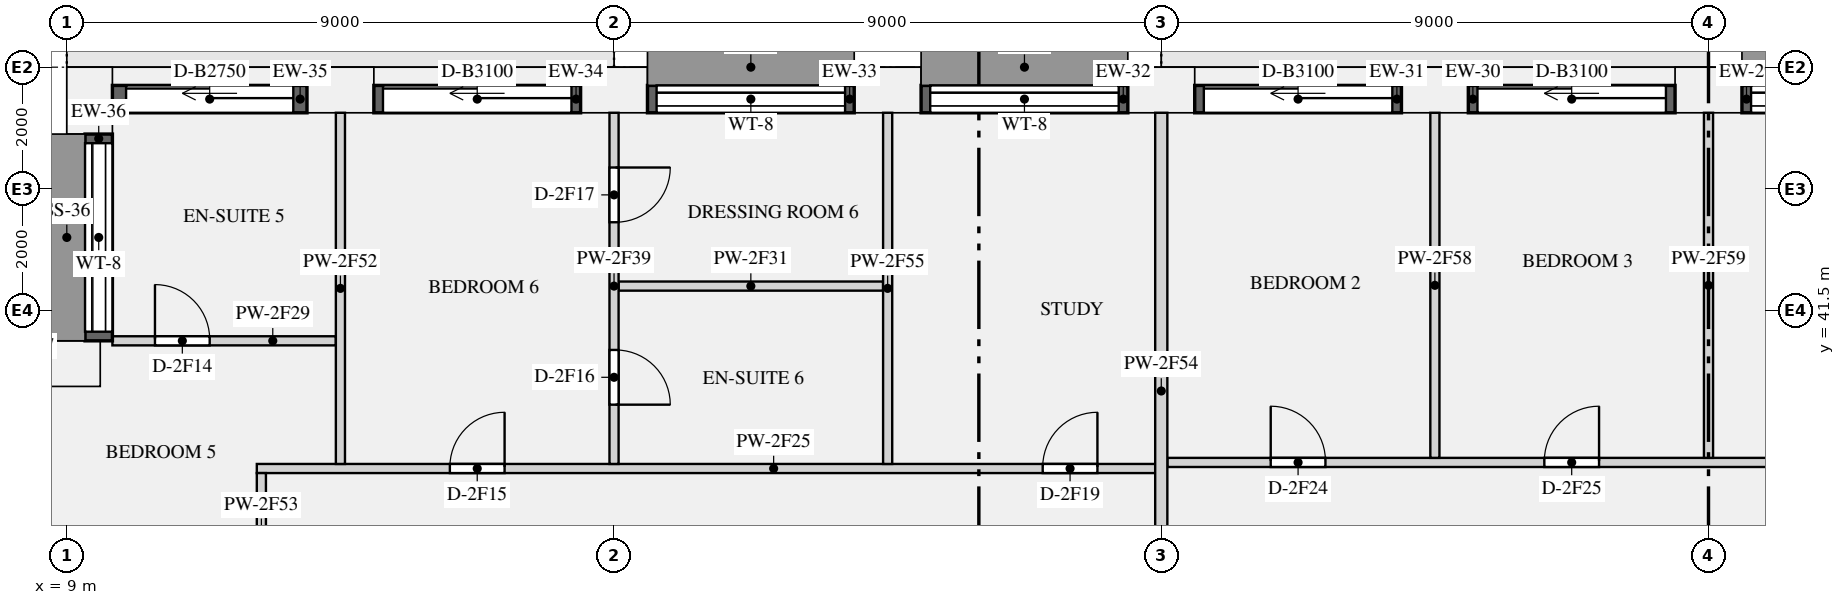
"""IFC4 building model, lengths in metres.
Left out: names, types, materials, properties, quantities, classifications, styles, units other than length and angle.
Written with IfcOpenShell. Run it as: python <this file> out.ifc"""

import sys

from ifc_helpers import new_model, si_unit, direction, frame, frame_2d, origin, origin_2d, place, context, subcontext, project, spatial, rectangle, extrude, element, fill, save


model = new_model("IFC4")
c1 = context("Model", 3, precision=1e-05, world=origin(), true_north=direction((0.0, 1.0)))
c2 = subcontext(c1, "Body", "Model", "MODEL_VIEW")
j1 = project(units=[si_unit("LENGTHUNIT", "METRE"), si_unit("PLANEANGLEUNIT", "RADIAN")], contexts=[c1])
p1 = place(None, origin())
s1 = spatial("IfcSite", under=j1, at=p1, CompositionType="ELEMENT")
p2 = place(p1, origin())
s2 = spatial("IfcBuilding", under=s1, at=p2, CompositionType="ELEMENT")
p3 = place(p2, frame((0.0, 0.0, 127.65)))
s3 = spatial("IfcBuildingStorey", under=s2, at=p3, CompositionType="ELEMENT", Elevation=127.65)
for number, where, z_axis, x_axis in (
    (1, (36.0, 45.125, 0.0), (0.0, 0.0, 1.0), (-1.0, 0.0, 0.0)),
    (2, (31.5, 45.125, 0.0), (0.0, 0.0, 1.0), (-1.0, 0.0, 0.0)),
    (3, (27.0, 45.125, 0.0), (0.0, 0.0, 1.0), (-1.0, 0.0, 0.0)),
    (4, (22.5, 45.125, 0.0), (0.0, 0.0, 1.0), (-1.0, 0.0, 0.0)),
    (5, (18.0, 45.125, 0.0), (0.0, 0.0, 1.0), (-1.0, 0.0, 0.0)),
    (6, (13.5, 45.125, 0.0), (0.0, 0.0, 1.0), (-1.0, 0.0, 0.0)),
    (7, (9.375, 44.95, 0.0), (0.0, 0.0, 1.0), (0.0, -1.0, 0.0)),
    (8, (9.0, 40.625, 0.0), (0.0, 0.0, 1.0), (-1.0, 0.0, 0.0)),
):
    element("IfcColumn", number, at=place(p3, frame(where, z_axis=z_axis, x_axis=x_axis)), inside=s3, PredefinedType="USERDEFINED", context=c2, shape_type="SweptSolid", body=[
        extrude(rectangle(XDim=1.1, YDim=0.75, at=origin_2d()), origin(), (0.0, 0.0, 1.0), 3.15),
    ])
p4 = place(p3, frame((39.95, 44.975, 0.9), z_axis=(0.0, 0.0, 1.0), x_axis=(-1.0, 0.0, 0.0)))
e9 = element("IfcWall", 9, at=p4, inside=s3, PredefinedType="SOLIDWALL", context=c2, shape_type="SweptSolid", body=[
    extrude(rectangle(XDim=3.4, YDim=0.45, at=frame_2d((1.7, 0.0))), origin(), (0.0, 0.0, 1.0), 1.75),
])
p5 = place(p4, frame((0.15, 0.0, 0.15)))
e10 = element("IfcOpeningElement", 10, at=p5, cuts=e9, PredefinedType="OPENING", context=c2, shape_type="SweptSolid", body=[
    extrude(rectangle(XDim=3.1, YDim=1.5, at=frame_2d((1.55, 0.75))), frame((0.0, 0.235, 0.0), z_axis=(0.0, -1.0, 0.0), x_axis=(1.0, 0.0, 0.0)), (0.0, 0.0, 1.0), 0.47),
])
p6 = place(p3, frame((35.45, 44.975, 0.0), z_axis=(0.0, 0.0, 1.0), x_axis=(-1.0, 0.0, 0.0)))
e11 = element("IfcWall", 11, at=p6, inside=s3, PredefinedType="SOLIDWALL", context=c2, shape_type="SweptSolid", body=[
    extrude(rectangle(XDim=3.4, YDim=0.45, at=frame_2d((1.7, 0.0))), origin(), (0.0, 0.0, 1.0), 2.65),
])
p7 = place(p6, frame((0.15, 0.0, 0.0)))
e12 = element("IfcOpeningElement", 12, at=p7, cuts=e11, PredefinedType="OPENING", context=c2, shape_type="SweptSolid", body=[
    extrude(rectangle(XDim=3.1, YDim=2.3, at=frame_2d((1.55, 1.15))), frame((0.0, 0.235, 0.0), z_axis=(0.0, -1.0, 0.0), x_axis=(1.0, 0.0, 0.0)), (0.0, 0.0, 1.0), 0.47),
])
p8 = place(p3, frame((30.95, 44.975, 0.0), z_axis=(0.0, 0.0, 1.0), x_axis=(-1.0, 0.0, 0.0)))
e13 = element("IfcWall", 13, at=p8, inside=s3, PredefinedType="SOLIDWALL", context=c2, shape_type="SweptSolid", body=[
    extrude(rectangle(XDim=3.4, YDim=0.45, at=frame_2d((1.7, 0.0))), origin(), (0.0, 0.0, 1.0), 2.65),
])
p9 = place(p8, frame((0.15, 0.0, 0.0)))
e14 = element("IfcOpeningElement", 14, at=p9, cuts=e13, PredefinedType="OPENING", context=c2, shape_type="SweptSolid", body=[
    extrude(rectangle(XDim=3.1, YDim=2.3, at=frame_2d((1.55, 1.15))), frame((0.0, 0.235, 0.0), z_axis=(0.0, -1.0, 0.0), x_axis=(1.0, 0.0, 0.0)), (0.0, 0.0, 1.0), 0.47),
])
p10 = place(p3, frame((26.45, 44.975, 0.9), z_axis=(0.0, 0.0, 1.0), x_axis=(-1.0, 0.0, 0.0)))
e15 = element("IfcWall", 15, at=p10, inside=s3, PredefinedType="SOLIDWALL", context=c2, shape_type="SweptSolid", body=[
    extrude(rectangle(XDim=3.4, YDim=0.45, at=frame_2d((1.7, 0.0))), origin(), (0.0, 0.0, 1.0), 1.75),
])
p11 = place(p10, frame((0.15, 0.0, 0.15)))
e16 = element("IfcOpeningElement", 16, at=p11, cuts=e15, PredefinedType="OPENING", context=c2, shape_type="SweptSolid", body=[
    extrude(rectangle(XDim=3.1, YDim=1.5, at=frame_2d((1.55, 0.75))), frame((0.0, 0.235, 0.0), z_axis=(0.0, -1.0, 0.0), x_axis=(1.0, 0.0, 0.0)), (0.0, 0.0, 1.0), 0.47),
])
p12 = place(p3, frame((21.95, 44.975, 0.9), z_axis=(0.0, 0.0, 1.0), x_axis=(-1.0, 0.0, 0.0)))
e17 = element("IfcWall", 17, at=p12, inside=s3, PredefinedType="SOLIDWALL", context=c2, shape_type="SweptSolid", body=[
    extrude(rectangle(XDim=3.4, YDim=0.45, at=frame_2d((1.7, 0.0))), origin(), (0.0, 0.0, 1.0), 1.75),
])
p13 = place(p12, frame((0.15, 0.0, 0.15)))
e18 = element("IfcOpeningElement", 18, at=p13, cuts=e17, PredefinedType="OPENING", context=c2, shape_type="SweptSolid", body=[
    extrude(rectangle(XDim=3.1, YDim=1.5, at=frame_2d((1.55, 0.75))), frame((0.0, 0.235, 0.0), z_axis=(0.0, -1.0, 0.0), x_axis=(1.0, 0.0, 0.0)), (0.0, 0.0, 1.0), 0.47),
])
p14 = place(p3, frame((17.45, 44.975, 0.0), z_axis=(0.0, 0.0, 1.0), x_axis=(-1.0, 0.0, 0.0)))
e19 = element("IfcWall", 19, at=p14, inside=s3, PredefinedType="SOLIDWALL", context=c2, shape_type="SweptSolid", body=[
    extrude(rectangle(XDim=3.4, YDim=0.45, at=frame_2d((1.7, 0.0))), origin(), (0.0, 0.0, 1.0), 2.65),
])
p15 = place(p14, frame((0.15, 0.0, 0.0)))
e20 = element("IfcOpeningElement", 20, at=p15, cuts=e19, PredefinedType="OPENING", context=c2, shape_type="SweptSolid", body=[
    extrude(rectangle(XDim=3.1, YDim=2.3, at=frame_2d((1.55, 1.15))), frame((0.0, 0.235, 0.0), z_axis=(0.0, -1.0, 0.0), x_axis=(1.0, 0.0, 0.0)), (0.0, 0.0, 1.0), 0.47),
])
p16 = place(p3, frame((12.95, 44.975, 0.0), z_axis=(0.0, 0.0, 1.0), x_axis=(-1.0, 0.0, 0.0)))
e21 = element("IfcWall", 21, at=p16, inside=s3, PredefinedType="SOLIDWALL", context=c2, shape_type="SweptSolid", body=[
    extrude(rectangle(XDim=3.2, YDim=0.45, at=frame_2d((1.6, 0.0))), origin(), (0.0, 0.0, 1.0), 2.65),
])
p17 = place(p16, frame((0.225, 0.0, 0.0)))
e22 = element("IfcOpeningElement", 22, at=p17, cuts=e21, PredefinedType="OPENING", context=c2, shape_type="SweptSolid", body=[
    extrude(rectangle(XDim=2.75, YDim=2.3, at=frame_2d((1.375, 1.15))), frame((0.0, 0.235, 0.0), z_axis=(0.0, -1.0, 0.0), x_axis=(1.0, 0.0, 0.0)), (0.0, 0.0, 1.0), 0.47),
])
p18 = place(p3, frame((9.525, 44.4, 0.9), z_axis=(0.0, 0.0, 1.0), x_axis=(0.0, -1.0, 0.0)))
e23 = element("IfcWall", 23, at=p18, inside=s3, PredefinedType="SOLIDWALL", context=c2, shape_type="SweptSolid", body=[
    extrude(rectangle(XDim=3.4, YDim=0.45, at=frame_2d((1.7, 0.0))), origin(), (0.0, 0.0, 1.0), 1.75),
])
p19 = place(p18, frame((0.15, 0.0, 0.15)))
e24 = element("IfcOpeningElement", 24, at=p19, cuts=e23, PredefinedType="OPENING", context=c2, shape_type="SweptSolid", body=[
    extrude(rectangle(XDim=3.1, YDim=1.5, at=frame_2d((1.55, 0.75))), frame((0.0, 0.235, 0.0), z_axis=(0.0, -1.0, 0.0), x_axis=(1.0, 0.0, 0.0)), (0.0, 0.0, 1.0), 0.47),
])
p20 = place(p3, frame((12.125, 38.9, 0.0), z_axis=(0.0, 0.0, 1.0), x_axis=(1.0, 0.0, 0.0)))
e25 = element("IfcWall", 25, at=p20, inside=s3, PredefinedType="PARTITIONING", context=c2, shape_type="SweptSolid", body=[
    extrude(rectangle(XDim=14.775, YDim=0.15, at=frame_2d((7.387, 0.0))), origin(), (0.0, 0.0, 1.0), 2.65),
])
p21 = place(p20, frame((3.175, 0.0, 0.0)))
e26 = element("IfcOpeningElement", 26, at=p21, cuts=e25, PredefinedType="OPENING", context=c2, shape_type="SweptSolid", body=[
    extrude(rectangle(XDim=0.9, YDim=2.1, at=frame_2d((0.45, 1.05))), frame((0.0, 0.085, 0.0), z_axis=(0.0, -1.0, 0.0), x_axis=(1.0, 0.0, 0.0)), (0.0, 0.0, 1.0), 0.17),
])
p22 = place(p20, frame((12.925, 0.0, 0.0)))
e27 = element("IfcOpeningElement", 27, at=p22, cuts=e25, PredefinedType="OPENING", context=c2, shape_type="SweptSolid", body=[
    extrude(rectangle(XDim=0.9, YDim=2.1, at=frame_2d((0.45, 1.05))), frame((0.0, 0.085, 0.0), z_axis=(0.0, -1.0, 0.0), x_axis=(1.0, 0.0, 0.0)), (0.0, 0.0, 1.0), 0.17),
])
p23 = place(p3, frame((9.75, 41.0, 0.0), z_axis=(0.0, 0.0, 1.0), x_axis=(1.0, 0.0, 0.0)))
e28 = element("IfcWall", 28, at=p23, inside=s3, PredefinedType="PARTITIONING", context=c2, shape_type="SweptSolid", body=[
    extrude(rectangle(XDim=3.675, YDim=0.15, at=frame_2d((1.837, 0.0))), origin(), (0.0, 0.0, 1.0), 2.65),
])
p24 = place(p23, frame((0.7, 0.0, 0.0)))
e29 = element("IfcOpeningElement", 29, at=p24, cuts=e28, PredefinedType="OPENING", context=c2, shape_type="SweptSolid", body=[
    extrude(rectangle(XDim=0.9, YDim=2.1, at=frame_2d((0.45, 1.05))), frame((0.0, 0.085, 0.0), z_axis=(0.0, -1.0, 0.0), x_axis=(1.0, 0.0, 0.0)), (0.0, 0.0, 1.0), 0.17),
])
p25 = place(p3, frame((18.075, 41.9, 0.0), z_axis=(0.0, 0.0, 1.0), x_axis=(1.0, 0.0, 0.0)))
e30 = element("IfcWall", 30, at=p25, inside=s3, PredefinedType="PARTITIONING", context=c2, shape_type="SweptSolid", body=[
    extrude(rectangle(XDim=4.35, YDim=0.15, at=frame_2d((2.175, 0.0))), origin(), (0.0, 0.0, 1.0), 2.65),
])
p26 = place(p3, frame((27.1, 39.0, 0.0), z_axis=(0.0, 0.0, 1.0), x_axis=(1.0, 0.0, 0.0)))
e31 = element("IfcWall", 31, at=p26, inside=s3, PredefinedType="PARTITIONING", context=c2, shape_type="SweptSolid", body=[
    extrude(rectangle(XDim=22.475, YDim=0.15, at=frame_2d((11.237, 0.0))), origin(), (0.0, 0.0, 1.0), 2.65),
])
p27 = place(p26, frame((1.7, 0.0, 0.0)))
e32 = element("IfcOpeningElement", 32, at=p27, cuts=e31, PredefinedType="OPENING", context=c2, shape_type="SweptSolid", body=[
    extrude(rectangle(XDim=0.9, YDim=2.1, at=frame_2d((0.45, 1.05))), frame((0.0, 0.085, 0.0), z_axis=(0.0, -1.0, 0.0), x_axis=(1.0, 0.0, 0.0)), (0.0, 0.0, 1.0), 0.17),
])
p28 = place(p26, frame((6.2, 0.0, 0.0)))
e33 = element("IfcOpeningElement", 33, at=p28, cuts=e31, PredefinedType="OPENING", context=c2, shape_type="SweptSolid", body=[
    extrude(rectangle(XDim=0.9, YDim=2.1, at=frame_2d((0.45, 1.05))), frame((0.0, 0.085, 0.0), z_axis=(0.0, -1.0, 0.0), x_axis=(1.0, 0.0, 0.0)), (0.0, 0.0, 1.0), 0.17),
])
p29 = place(p26, frame((12.95, 0.0, 0.0)))
e34 = element("IfcOpeningElement", 34, at=p29, cuts=e31, PredefinedType="OPENING", context=c2, shape_type="SweptSolid", body=[
    extrude(rectangle(XDim=0.9, YDim=2.1, at=frame_2d((0.45, 1.05))), frame((0.0, 0.085, 0.0), z_axis=(0.0, -1.0, 0.0), x_axis=(1.0, 0.0, 0.0)), (0.0, 0.0, 1.0), 0.17),
])
p30 = place(p3, frame((18.0, 38.975, 0.0), z_axis=(0.0, 0.0, 1.0), x_axis=(0.0, 1.0, 0.0)))
e35 = element("IfcWall", 35, at=p30, inside=s3, PredefinedType="PARTITIONING", context=c2, shape_type="SweptSolid", body=[
    extrude(rectangle(XDim=5.775, YDim=0.15, at=frame_2d((2.887, 0.0))), origin(), (0.0, 0.0, 1.0), 2.65),
])
p31 = place(p30, frame((0.975, 0.0, 0.0)))
e36 = element("IfcOpeningElement", 36, at=p31, cuts=e35, PredefinedType="OPENING", context=c2, shape_type="SweptSolid", body=[
    extrude(rectangle(XDim=0.9, YDim=2.1, at=frame_2d((0.45, 1.05))), frame((0.0, 0.085, 0.0), z_axis=(0.0, -1.0, 0.0), x_axis=(1.0, 0.0, 0.0)), (0.0, 0.0, 1.0), 0.17),
])
p32 = place(p30, frame((3.975, 0.0, 0.0)))
e37 = element("IfcOpeningElement", 37, at=p32, cuts=e35, PredefinedType="OPENING", context=c2, shape_type="SweptSolid", body=[
    extrude(rectangle(XDim=0.9, YDim=2.1, at=frame_2d((0.45, 1.05))), frame((0.0, 0.085, 0.0), z_axis=(0.0, -1.0, 0.0), x_axis=(1.0, 0.0, 0.0)), (0.0, 0.0, 1.0), 0.17),
])
p33 = place(p3, frame((13.5, 38.975, 0.0), z_axis=(0.0, 0.0, 1.0), x_axis=(0.0, 1.0, 0.0)))
e38 = element("IfcWall", 38, at=p33, inside=s3, PredefinedType="PARTITIONING", context=c2, shape_type="SweptSolid", body=[
    extrude(rectangle(XDim=5.775, YDim=0.15, at=frame_2d((2.887, 0.0))), origin(), (0.0, 0.0, 1.0), 2.65),
])
p34 = place(p3, frame((12.2, 36.908, 0.0), z_axis=(0.0, 0.0, 1.0), x_axis=(0.0, 1.0, 0.0)))
e39 = element("IfcWall", 39, at=p34, inside=s3, PredefinedType="PARTITIONING", context=c2, shape_type="SweptSolid", body=[
    extrude(rectangle(XDim=1.917, YDim=0.15, at=frame_2d((0.958, 0.0))), origin(), (0.0, 0.0, 1.0), 2.65),
])
p35 = place(p3, frame((27.0, 35.6, 0.0), z_axis=(0.0, 0.0, 1.0), x_axis=(0.0, 1.0, 0.0)))
e40 = element("IfcWall", 40, at=p35, inside=s3, PredefinedType="PARTITIONING", context=c2, shape_type="SweptSolid", body=[
    extrude(rectangle(XDim=9.15, YDim=0.2, at=frame_2d((4.575, 0.0))), origin(), (0.0, 0.0, 1.0), 2.65),
])
p36 = place(p3, frame((22.5, 38.975, 0.0), z_axis=(0.0, 0.0, 1.0), x_axis=(0.0, 1.0, 0.0)))
e41 = element("IfcWall", 41, at=p36, inside=s3, PredefinedType="PARTITIONING", context=c2, shape_type="SweptSolid", body=[
    extrude(rectangle(XDim=5.775, YDim=0.15, at=frame_2d((2.887, 0.0))), origin(), (0.0, 0.0, 1.0), 2.65),
])
for number, where, z_axis, x_axis in (
    (42, (31.5, 39.075, 0.0), (0.0, 0.0, 1.0), (0.0, 1.0, 0.0)),
    (43, (36.0, 39.075, 0.0), (0.0, 0.0, 1.0), (0.0, 1.0, 0.0)),
):
    element("IfcWall", number, at=place(p3, frame(where, z_axis=z_axis, x_axis=x_axis)), inside=s3, PredefinedType="PARTITIONING", context=c2, shape_type="SweptSolid", body=[
        extrude(rectangle(XDim=5.675, YDim=0.15, at=frame_2d((2.837, 0.0))), origin(), (0.0, 0.0, 1.0), 2.65),
    ])
p37 = place(p5, origin())
e44 = element("IfcWindow", 44, at=p37, inside=s3, PartitioningType="SINGLE_PANEL", PredefinedType="WINDOW", context=c2, shape_type="SweptSolid", body=[
    extrude(rectangle(XDim=3.1, YDim=1.5, at=frame_2d((1.55, 0.75))), frame((0.0, -0.065, 0.0), z_axis=(0.0, -1.0, 0.0), x_axis=(1.0, 0.0, 0.0)), (0.0, 0.0, 1.0), 0.06),
])
fill(e10, e44)
p38 = place(p7, origin())
e45 = element("IfcDoor", 45, at=p38, inside=s3, OperationType="SLIDING_TO_LEFT", PredefinedType="DOOR", context=c2, shape_type="SweptSolid", body=[
    extrude(rectangle(XDim=3.1, YDim=2.3, at=frame_2d((1.55, 1.15))), frame((0.0, -0.07, 0.0), z_axis=(0.0, -1.0, 0.0), x_axis=(1.0, 0.0, 0.0)), (0.0, 0.0, 1.0), 0.05),
])
fill(e12, e45)
p39 = place(p9, origin())
e46 = element("IfcDoor", 46, at=p39, inside=s3, OperationType="SLIDING_TO_LEFT", PredefinedType="DOOR", context=c2, shape_type="SweptSolid", body=[
    extrude(rectangle(XDim=3.1, YDim=2.3, at=frame_2d((1.55, 1.15))), frame((0.0, -0.07, 0.0), z_axis=(0.0, -1.0, 0.0), x_axis=(1.0, 0.0, 0.0)), (0.0, 0.0, 1.0), 0.05),
])
fill(e14, e46)
p40 = place(p11, origin())
e47 = element("IfcWindow", 47, at=p40, inside=s3, PartitioningType="SINGLE_PANEL", PredefinedType="WINDOW", context=c2, shape_type="SweptSolid", body=[
    extrude(rectangle(XDim=3.1, YDim=1.5, at=frame_2d((1.55, 0.75))), frame((0.0, -0.065, 0.0), z_axis=(0.0, -1.0, 0.0), x_axis=(1.0, 0.0, 0.0)), (0.0, 0.0, 1.0), 0.06),
])
fill(e16, e47)
p41 = place(p13, origin())
e48 = element("IfcWindow", 48, at=p41, inside=s3, PartitioningType="SINGLE_PANEL", PredefinedType="WINDOW", context=c2, shape_type="SweptSolid", body=[
    extrude(rectangle(XDim=3.1, YDim=1.5, at=frame_2d((1.55, 0.75))), frame((0.0, -0.065, 0.0), z_axis=(0.0, -1.0, 0.0), x_axis=(1.0, 0.0, 0.0)), (0.0, 0.0, 1.0), 0.06),
])
fill(e18, e48)
p42 = place(p15, origin())
e49 = element("IfcDoor", 49, at=p42, inside=s3, OperationType="SLIDING_TO_LEFT", PredefinedType="DOOR", context=c2, shape_type="SweptSolid", body=[
    extrude(rectangle(XDim=3.1, YDim=2.3, at=frame_2d((1.55, 1.15))), frame((0.0, -0.07, 0.0), z_axis=(0.0, -1.0, 0.0), x_axis=(1.0, 0.0, 0.0)), (0.0, 0.0, 1.0), 0.05),
])
fill(e20, e49)
p43 = place(p17, origin())
e50 = element("IfcDoor", 50, at=p43, inside=s3, OperationType="SLIDING_TO_LEFT", PredefinedType="DOOR", context=c2, shape_type="SweptSolid", body=[
    extrude(rectangle(XDim=2.75, YDim=2.3, at=frame_2d((1.375, 1.15))), frame((0.0, -0.07, 0.0), z_axis=(0.0, -1.0, 0.0), x_axis=(1.0, 0.0, 0.0)), (0.0, 0.0, 1.0), 0.05),
])
fill(e22, e50)
p44 = place(p19, origin())
e51 = element("IfcWindow", 51, at=p44, inside=s3, PartitioningType="SINGLE_PANEL", PredefinedType="WINDOW", context=c2, shape_type="SweptSolid", body=[
    extrude(rectangle(XDim=3.1, YDim=1.5, at=frame_2d((1.55, 0.75))), frame((0.0, -0.065, 0.0), z_axis=(0.0, -1.0, 0.0), x_axis=(1.0, 0.0, 0.0)), (0.0, 0.0, 1.0), 0.06),
])
fill(e24, e51)
p45 = place(p24, origin())
e52 = element("IfcDoor", 52, at=p45, inside=s3, OperationType="SINGLE_SWING_LEFT", PredefinedType="DOOR", context=c2, shape_type="SweptSolid", body=[
    extrude(rectangle(XDim=0.9, YDim=2.1, at=frame_2d((0.45, 1.05))), frame((0.0, 0.025, 0.0), z_axis=(0.0, -1.0, 0.0), x_axis=(1.0, 0.0, 0.0)), (0.0, 0.0, 1.0), 0.05),
])
fill(e29, e52)
p46 = place(p21, origin())
e53 = element("IfcDoor", 53, at=p46, inside=s3, OperationType="SINGLE_SWING_RIGHT", PredefinedType="DOOR", context=c2, shape_type="SweptSolid", body=[
    extrude(rectangle(XDim=0.9, YDim=2.1, at=frame_2d((0.45, 1.05))), frame((0.0, 0.025, 0.0), z_axis=(0.0, -1.0, 0.0), x_axis=(1.0, 0.0, 0.0)), (0.0, 0.0, 1.0), 0.05),
])
fill(e26, e53)
p47 = place(p31, frame((0.9, 0.0, 0.0), z_axis=(0.0, 0.0, 1.0), x_axis=(-1.0, 0.0, 0.0)))
e54 = element("IfcDoor", 54, at=p47, inside=s3, OperationType="SINGLE_SWING_RIGHT", PredefinedType="DOOR", context=c2, shape_type="SweptSolid", body=[
    extrude(rectangle(XDim=0.9, YDim=2.1, at=frame_2d((0.45, 1.05))), frame((0.0, 0.025, 0.0), z_axis=(0.0, -1.0, 0.0), x_axis=(1.0, 0.0, 0.0)), (0.0, 0.0, 1.0), 0.05),
])
fill(e36, e54)
p48 = place(p32, frame((0.9, 0.0, 0.0), z_axis=(0.0, 0.0, 1.0), x_axis=(-1.0, 0.0, 0.0)))
e55 = element("IfcDoor", 55, at=p48, inside=s3, OperationType="SINGLE_SWING_LEFT", PredefinedType="DOOR", context=c2, shape_type="SweptSolid", body=[
    extrude(rectangle(XDim=0.9, YDim=2.1, at=frame_2d((0.45, 1.05))), frame((0.0, 0.025, 0.0), z_axis=(0.0, -1.0, 0.0), x_axis=(1.0, 0.0, 0.0)), (0.0, 0.0, 1.0), 0.05),
])
fill(e37, e55)
p49 = place(p22, origin())
e56 = element("IfcDoor", 56, at=p49, inside=s3, OperationType="SINGLE_SWING_RIGHT", PredefinedType="DOOR", context=c2, shape_type="SweptSolid", body=[
    extrude(rectangle(XDim=0.9, YDim=2.1, at=frame_2d((0.45, 1.05))), frame((0.0, 0.025, 0.0), z_axis=(0.0, -1.0, 0.0), x_axis=(1.0, 0.0, 0.0)), (0.0, 0.0, 1.0), 0.05),
])
fill(e27, e56)
p50 = place(p27, origin())
e57 = element("IfcDoor", 57, at=p50, inside=s3, OperationType="SINGLE_SWING_LEFT", PredefinedType="DOOR", context=c2, shape_type="SweptSolid", body=[
    extrude(rectangle(XDim=0.9, YDim=2.1, at=frame_2d((0.45, 1.05))), frame((0.0, 0.025, 0.0), z_axis=(0.0, -1.0, 0.0), x_axis=(1.0, 0.0, 0.0)), (0.0, 0.0, 1.0), 0.05),
])
fill(e32, e57)
p51 = place(p28, origin())
e58 = element("IfcDoor", 58, at=p51, inside=s3, OperationType="SINGLE_SWING_RIGHT", PredefinedType="DOOR", context=c2, shape_type="SweptSolid", body=[
    extrude(rectangle(XDim=0.9, YDim=2.1, at=frame_2d((0.45, 1.05))), frame((0.0, 0.025, 0.0), z_axis=(0.0, -1.0, 0.0), x_axis=(1.0, 0.0, 0.0)), (0.0, 0.0, 1.0), 0.05),
])
fill(e33, e58)
save(model, sys.argv[1])
